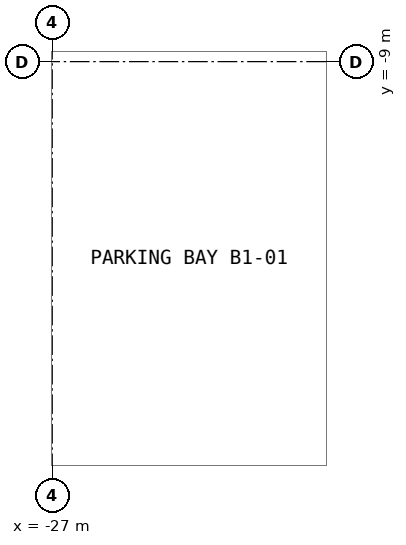
"""IFC4 building model, lengths in metres.
Left out: names, types, materials, properties, quantities, classifications, styles, units other than length and angle.
Written with IfcOpenShell. Run it as: python <this file> out.ifc"""

import sys

from ifc_helpers import new_model, si_unit, direction, frame, frame_2d, origin, place, context, subcontext, project, spatial, rectangle, extrude, element, save


model = new_model("IFC4")
c1 = context("Model", 3, precision=1e-05, world=origin(), true_north=direction((0.0, 1.0)))
c2 = subcontext(c1, "Body", "Model", "MODEL_VIEW")
j1 = project(units=[si_unit("LENGTHUNIT", "METRE"), si_unit("PLANEANGLEUNIT", "RADIAN")], contexts=[c1])
p1 = place(None, origin())
s1 = spatial("IfcSite", under=j1, at=p1, CompositionType="ELEMENT")
p2 = place(p1, origin())
s2 = spatial("IfcBuilding", under=s1, at=p2, CompositionType="ELEMENT")
p3 = place(p2, frame((0.0, 0.0, -4.2)))
s3 = spatial("IfcBuildingStorey", under=s2, at=p3, CompositionType="ELEMENT", Elevation=-4.2)
p4 = place(p3, frame((-6.74, 32.759, 0.0), z_axis=(0.0, 0.0, 1.0), x_axis=(-0.500000005698, -0.866025400495, 0.0)))
e1 = element("IfcWall", 1, at=p4, inside=s3, PredefinedType="SOLIDWALL", context=c2, shape_type="SweptSolid", body=[
    extrude(rectangle(XDim=50.0, YDim=0.6, at=frame_2d((25.0, 0.0))), origin(), (0.0, 0.0, 1.0), 3.75),
])
p5 = place(p3, frame((-31.74, -10.242, 0.0), z_axis=(0.0, 0.0, 1.0), x_axis=(0.499995173006, -0.866028190633, 0.0)))
e2 = element("IfcWall", 2, at=p5, inside=s3, PredefinedType="SOLIDWALL", context=c2, shape_type="SweptSolid", body=[
    extrude(rectangle(XDim=14.0, YDim=0.6, at=frame_2d((7.0, 0.0))), origin(), (0.0, 0.0, 1.0), 3.75),
])
save(model, sys.argv[1])
